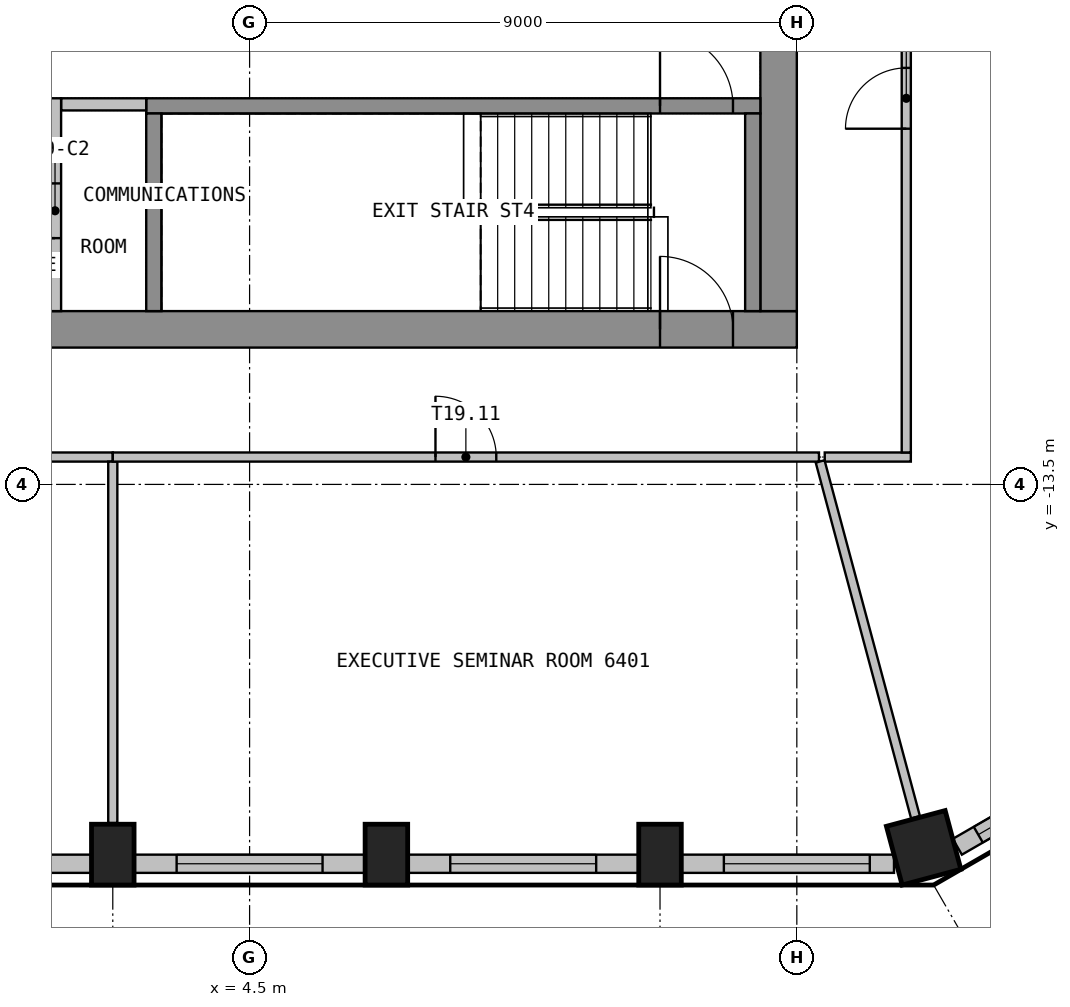
"""IFC4 building model, lengths in metres.
Left out: names, types, materials, properties, quantities, classifications, styles, units other than length and angle.
Written with IfcOpenShell. Run it as: python <this file> out.ifc"""

import sys

from ifc_helpers import new_model, si_unit, direction, frame, frame_2d, origin, origin_2d, place, context, subcontext, project, spatial, rectangle, extrude, element, fill, save


model = new_model("IFC4")
c1 = context("Model", 3, precision=1e-05, world=origin(), true_north=direction((0.0, 1.0)))
c2 = subcontext(c1, "Body", "Model", "MODEL_VIEW")
j1 = project(units=[si_unit("LENGTHUNIT", "METRE"), si_unit("PLANEANGLEUNIT", "RADIAN")], contexts=[c1])
p1 = place(None, origin())
s1 = spatial("IfcSite", under=j1, at=p1, CompositionType="ELEMENT")
p2 = place(p1, origin())
s2 = spatial("IfcBuilding", under=s1, at=p2, CompositionType="ELEMENT")
p3 = place(p2, frame((0.0, 0.0, 258.6)))
s3 = spatial("IfcBuildingStorey", under=s2, at=p3, CompositionType="ELEMENT", Elevation=258.6)
for number, where, z_axis, x_axis in (
    (1, (2.25, -19.588, 0.0), (0.0, 0.0, 1.0), (1.0, 0.0, 0.0)),
    (2, (6.75, -19.588, 0.0), (0.0, 0.0, 1.0), (1.0, 0.0, 0.0)),
    (3, (11.25, -19.588, 0.0), (0.0, 0.0, 1.0), (1.0, 0.0, 0.0)),
):
    element("IfcColumn", number, at=place(p3, frame(where, z_axis=z_axis, x_axis=x_axis)), inside=s3, PredefinedType="COLUMN", context=c2, shape_type="SweptSolid", body=[
        extrude(rectangle(XDim=0.7, YDim=1.0, at=origin_2d()), origin(), (0.0, 0.0, 1.0), 3.575),
    ])
p4 = place(p3, frame((15.586, -19.476, 0.0), z_axis=(0.0, 0.0, 1.0), x_axis=(0.965925826289, 0.258819045103, 0.0)))
e4 = element("IfcColumn", 4, at=p4, inside=s3, PredefinedType="COLUMN", context=c2, shape_type="SweptSolid", body=[
    extrude(rectangle(XDim=1.0, YDim=1.0, at=origin_2d()), origin(), (0.0, 0.0, 1.0), 3.575),
])
p5 = place(p3, frame((-1.899, -19.739, 0.0), z_axis=(0.0, 0.0, 1.0), x_axis=(1.0, 0.0, 0.0)))
e5 = element("IfcWall", 5, at=p5, inside=s3, PredefinedType="SOLIDWALL", context=c2, shape_type="SweptSolid", body=[
    extrude(rectangle(XDim=3.799, YDim=0.3, at=frame_2d((1.899, 0.0))), origin(), (0.0, 0.0, 1.0), 3.575),
])
p6 = place(p5, frame((0.699, 0.0, 0.9)))
e6 = element("IfcOpeningElement", 6, at=p6, cuts=e5, PredefinedType="OPENING", context=c2, shape_type="SweptSolid", body=[
    extrude(rectangle(XDim=2.4, YDim=2.1, at=frame_2d((1.2, 1.05))), frame((0.0, 0.16, 0.0), z_axis=(0.0, -1.0, 0.0), x_axis=(1.0, 0.0, 0.0)), (0.0, 0.0, 1.0), 0.32),
])
p7 = place(p3, frame((2.601, -19.739, 0.0), z_axis=(0.0, 0.0, 1.0), x_axis=(1.0, 0.0, 0.0)))
e7 = element("IfcWall", 7, at=p7, inside=s3, PredefinedType="SOLIDWALL", context=c2, shape_type="SweptSolid", body=[
    extrude(rectangle(XDim=3.799, YDim=0.3, at=frame_2d((1.899, 0.0))), origin(), (0.0, 0.0, 1.0), 3.575),
])
p8 = place(p7, frame((0.699, 0.0, 0.9)))
e8 = element("IfcOpeningElement", 8, at=p8, cuts=e7, PredefinedType="OPENING", context=c2, shape_type="SweptSolid", body=[
    extrude(rectangle(XDim=2.4, YDim=2.1, at=frame_2d((1.2, 1.05))), frame((0.0, 0.16, 0.0), z_axis=(0.0, -1.0, 0.0), x_axis=(1.0, 0.0, 0.0)), (0.0, 0.0, 1.0), 0.32),
])
p9 = place(p3, frame((7.101, -19.739, 0.0), z_axis=(0.0, 0.0, 1.0), x_axis=(1.0, 0.0, 0.0)))
e9 = element("IfcWall", 9, at=p9, inside=s3, PredefinedType="SOLIDWALL", context=c2, shape_type="SweptSolid", body=[
    extrude(rectangle(XDim=3.799, YDim=0.3, at=frame_2d((1.899, 0.0))), origin(), (0.0, 0.0, 1.0), 3.575),
])
p10 = place(p9, frame((0.699, 0.0, 0.9)))
e10 = element("IfcOpeningElement", 10, at=p10, cuts=e9, PredefinedType="OPENING", context=c2, shape_type="SweptSolid", body=[
    extrude(rectangle(XDim=2.4, YDim=2.1, at=frame_2d((1.2, 1.05))), frame((0.0, 0.16, 0.0), z_axis=(0.0, -1.0, 0.0), x_axis=(1.0, 0.0, 0.0)), (0.0, 0.0, 1.0), 0.32),
])
p11 = place(p3, frame((11.601, -19.739, 0.0), z_axis=(0.0, 0.0, 1.0), x_axis=(1.0, 0.0, 0.0)))
e11 = element("IfcWall", 11, at=p11, inside=s3, PredefinedType="SOLIDWALL", context=c2, shape_type="SweptSolid", body=[
    extrude(rectangle(XDim=3.498, YDim=0.3, at=frame_2d((1.749, 0.0))), origin(), (0.0, 0.0, 1.0), 3.575),
])
p12 = place(p11, frame((0.699, 0.0, 0.9)))
e12 = element("IfcOpeningElement", 12, at=p12, cuts=e11, PredefinedType="OPENING", context=c2, shape_type="SweptSolid", body=[
    extrude(rectangle(XDim=2.4, YDim=2.1, at=frame_2d((1.2, 1.05))), frame((0.0, 0.16, 0.0), z_axis=(0.0, -1.0, 0.0), x_axis=(1.0, 0.0, 0.0)), (0.0, 0.0, 1.0), 0.32),
])
p13 = place(p3, frame((16.14, -19.459, 0.0), z_axis=(0.0, 0.0, 1.0), x_axis=(0.866025316205, 0.500000151692, 0.0)))
e13 = element("IfcWall", 13, at=p13, inside=s3, PredefinedType="SOLIDWALL", context=c2, shape_type="SweptSolid", body=[
    extrude(rectangle(XDim=3.196, YDim=0.3, at=frame_2d((1.598, 0.0))), origin(), (0.0, 0.0, 1.0), 3.575),
])
p14 = place(p13, frame((0.398, 0.0, 0.9)))
e14 = element("IfcOpeningElement", 14, at=p14, cuts=e13, PredefinedType="OPENING", context=c2, shape_type="SweptSolid", body=[
    extrude(rectangle(XDim=2.4, YDim=2.1, at=frame_2d((1.2, 1.05))), frame((0.0, 0.16, 0.0), z_axis=(0.0, -1.0, 0.0), x_axis=(1.0, 0.0, 0.0)), (0.0, 0.0, 1.0), 0.32),
])
p15 = place(p3, frame((-13.5, -10.95, 0.0), z_axis=(0.0, 0.0, 1.0), x_axis=(1.0, 0.0, 0.0)))
e15 = element("IfcWall", 15, at=p15, inside=s3, PredefinedType="SHEAR", context=c2, shape_type="SweptSolid", body=[
    extrude(rectangle(XDim=27.0, YDim=0.6, at=frame_2d((13.5, 0.0))), origin(), (0.0, 0.0, 1.0), 3.575),
])
p16 = place(p15, frame((12.3, 0.0, 0.0)))
e16 = element("IfcOpeningElement", 16, at=p16, cuts=e15, PredefinedType="OPENING", context=c2, shape_type="SweptSolid", body=[
    extrude(rectangle(XDim=2.4, YDim=2.1, at=frame_2d((1.2, 1.05))), frame((0.0, 0.31, 0.0), z_axis=(0.0, -1.0, 0.0), x_axis=(1.0, 0.0, 0.0)), (0.0, 0.0, 1.0), 0.62),
])
p17 = place(p15, frame((1.05, 0.0, 0.0)))
e17 = element("IfcOpeningElement", 17, at=p17, cuts=e15, PredefinedType="OPENING", context=c2, shape_type="SweptSolid", body=[
    extrude(rectangle(XDim=1.2, YDim=2.1, at=frame_2d((0.6, 1.05))), frame((0.0, 0.31, 0.0), z_axis=(0.0, -1.0, 0.0), x_axis=(1.0, 0.0, 0.0)), (0.0, 0.0, 1.0), 0.62),
])
p18 = place(p15, frame((24.75, 0.0, 0.0)))
e18 = element("IfcOpeningElement", 18, at=p18, cuts=e15, PredefinedType="OPENING", context=c2, shape_type="SweptSolid", body=[
    extrude(rectangle(XDim=1.2, YDim=2.1, at=frame_2d((0.6, 1.05))), frame((0.0, 0.31, 0.0), z_axis=(0.0, -1.0, 0.0), x_axis=(1.0, 0.0, 0.0)), (0.0, 0.0, 1.0), 0.62),
])
p19 = place(p3, frame((13.2, -10.65, 0.0), z_axis=(0.0, 0.0, 1.0), x_axis=(0.0, 1.0, 0.0)))
e19 = element("IfcWall", 19, at=p19, inside=s3, PredefinedType="SHEAR", context=c2, shape_type="SweptSolid", body=[
    extrude(rectangle(XDim=21.3, YDim=0.6, at=frame_2d((10.65, 0.0))), origin(), (0.0, 0.0, 1.0), 3.575),
])
p20 = place(p19, frame((9.45, 0.0, 0.0)))
e20 = element("IfcOpeningElement", 20, at=p20, cuts=e19, PredefinedType="OPENING", context=c2, shape_type="SweptSolid", body=[
    extrude(rectangle(XDim=2.4, YDim=2.1, at=frame_2d((1.2, 1.05))), frame((0.0, 0.31, 0.0), z_axis=(0.0, -1.0, 0.0), x_axis=(1.0, 0.0, 0.0)), (0.0, 0.0, 1.0), 0.62),
])
p21 = place(p3, frame((2.8, -7.275, 0.0), z_axis=(0.0, 0.0, 1.0), x_axis=(1.0, 0.0, 0.0)))
e21 = element("IfcWall", 21, at=p21, inside=s3, PredefinedType="SHEAR", context=c2, shape_type="SweptSolid", body=[
    extrude(rectangle(XDim=10.1, YDim=0.25, at=frame_2d((5.05, 0.0))), origin(), (0.0, 0.0, 1.0), 3.575),
])
p22 = place(p21, frame((8.45, 0.0, 0.0)))
e22 = element("IfcOpeningElement", 22, at=p22, cuts=e21, PredefinedType="OPENING", context=c2, shape_type="SweptSolid", body=[
    extrude(rectangle(XDim=1.2, YDim=2.1, at=frame_2d((0.6, 1.05))), frame((0.0, 0.135, 0.0), z_axis=(0.0, -1.0, 0.0), x_axis=(1.0, 0.0, 0.0)), (0.0, 0.0, 1.0), 0.27),
])
for number, where, z_axis, x_axis in (
    (23, (2.925, -10.65, 0.0), (0.0, 0.0, 1.0), (0.0, 1.0, 0.0)),
    (24, (12.775, -10.65, 0.0), (0.0, 0.0, 1.0), (0.0, 1.0, 0.0)),
):
    element("IfcWall", number, at=place(p3, frame(where, z_axis=z_axis, x_axis=x_axis)), inside=s3, PredefinedType="SHEAR", context=c2, shape_type="SweptSolid", body=[
        extrude(rectangle(XDim=3.25, YDim=0.25, at=frame_2d((1.625, 0.0))), origin(), (0.0, 0.0, 1.0), 3.575),
    ])
p23 = place(p3, frame((1.4, -7.25, 0.0), z_axis=(0.0, 0.0, 1.0), x_axis=(1.0, 0.0, 0.0)))
e25 = element("IfcWall", 25, at=p23, inside=s3, PredefinedType="PARTITIONING", context=c2, shape_type="SweptSolid", body=[
    extrude(rectangle(XDim=1.4, YDim=0.2, at=frame_2d((0.7, 0.0))), origin(), (0.0, 0.0, 1.0), 3.575),
])
p24 = place(p3, frame((1.3, -10.65, 0.0), z_axis=(0.0, 0.0, 1.0), x_axis=(0.0, 1.0, 0.0)))
e26 = element("IfcWall", 26, at=p24, inside=s3, PredefinedType="PARTITIONING", context=c2, shape_type="SweptSolid", body=[
    extrude(rectangle(XDim=3.5, YDim=0.2, at=frame_2d((1.75, 0.0))), origin(), (0.0, 0.0, 1.0), 3.575),
])
p25 = place(p24, frame((1.2, 0.0, 0.0)))
e27 = element("IfcOpeningElement", 27, at=p25, cuts=e26, PredefinedType="OPENING", context=c2, shape_type="SweptSolid", body=[
    extrude(rectangle(XDim=0.9, YDim=2.1, at=frame_2d((0.45, 1.05))), frame((0.0, 0.11, 0.0), z_axis=(0.0, -1.0, 0.0), x_axis=(1.0, 0.0, 0.0)), (0.0, 0.0, 1.0), 0.22),
])
p26 = place(p3, frame((-11.25, -13.05, 0.0), z_axis=(0.0, 0.0, 1.0), x_axis=(1.0, 0.0, 0.0)))
e28 = element("IfcWall", 28, at=p26, inside=s3, PredefinedType="PARTITIONING", context=c2, shape_type="SweptSolid", body=[
    extrude(rectangle(XDim=13.5, YDim=0.15, at=frame_2d((6.75, 0.0))), origin(), (0.0, 0.0, 1.0), 3.575),
])
p27 = place(p26, frame((6.25, 0.0, 0.0)))
e29 = element("IfcOpeningElement", 29, at=p27, cuts=e28, PredefinedType="OPENING", context=c2, shape_type="SweptSolid", body=[
    extrude(rectangle(XDim=1.0, YDim=2.1, at=frame_2d((0.5, 1.05))), frame((0.0, 0.085, 0.0), z_axis=(0.0, -1.0, 0.0), x_axis=(1.0, 0.0, 0.0)), (0.0, 0.0, 1.0), 0.17),
])
p28 = place(p3, frame((2.25, -13.125, 0.0), z_axis=(0.0, 0.0, 1.0), x_axis=(0.0, -1.0, 0.0)))
e30 = element("IfcWall", 30, at=p28, inside=s3, PredefinedType="PARTITIONING", context=c2, shape_type="SweptSolid", body=[
    extrude(rectangle(XDim=5.944, YDim=0.15, at=frame_2d((2.972, 0.0))), origin(), (0.0, 0.0, 1.0), 3.575),
])
p29 = place(p3, frame((2.25, -13.05, 0.0), z_axis=(0.0, 0.0, 1.0), x_axis=(1.0, 0.0, 0.0)))
e31 = element("IfcWall", 31, at=p29, inside=s3, PredefinedType="PARTITIONING", context=c2, shape_type="SweptSolid", body=[
    extrude(rectangle(XDim=11.614, YDim=0.15, at=frame_2d((5.807, 0.0))), origin(), (0.0, 0.0, 1.0), 3.575),
])
p30 = place(p29, frame((5.307, 0.0, 0.0)))
e32 = element("IfcOpeningElement", 32, at=p30, cuts=e31, PredefinedType="OPENING", context=c2, shape_type="SweptSolid", body=[
    extrude(rectangle(XDim=1.0, YDim=2.1, at=frame_2d((0.5, 1.05))), frame((0.0, 0.085, 0.0), z_axis=(0.0, -1.0, 0.0), x_axis=(1.0, 0.0, 0.0)), (0.0, 0.0, 1.0), 0.17),
])
p31 = place(p3, frame((13.959, -13.05, 0.0), z_axis=(0.0, 0.0, 1.0), x_axis=(1.0, 0.0, 0.0)))
e33 = element("IfcWall", 33, at=p31, inside=s3, PredefinedType="PARTITIONING", context=c2, shape_type="SweptSolid", body=[
    extrude(rectangle(XDim=1.416, YDim=0.15, at=frame_2d((0.708, 0.0))), origin(), (0.0, 0.0, 1.0), 3.575),
])
p32 = place(p3, frame((13.883, -13.122, 0.0), z_axis=(0.0, 0.0, 1.0), x_axis=(0.258896568031, -0.965905050749, 0.0)))
e34 = element("IfcWall", 34, at=p32, inside=s3, PredefinedType="PARTITIONING", context=c2, shape_type="SweptSolid", body=[
    extrude(rectangle(XDim=6.058, YDim=0.15, at=frame_2d((3.029, 0.0))), origin(), (0.0, 0.0, 1.0), 3.575),
])
p33 = place(p3, frame((15.3, -12.975, 0.0), z_axis=(0.0, 0.0, 1.0), x_axis=(0.0, 1.0, 0.0)))
e35 = element("IfcWall", 35, at=p33, inside=s3, PredefinedType="PARTITIONING", context=c2, shape_type="SweptSolid", body=[
    extrude(rectangle(XDim=11.649, YDim=0.15, at=frame_2d((5.825, 0.0))), origin(), (0.0, 0.0, 1.0), 3.575),
])
p34 = place(p33, frame((5.324, 0.0, 0.0)))
e36 = element("IfcOpeningElement", 36, at=p34, cuts=e35, PredefinedType="OPENING", context=c2, shape_type="SweptSolid", body=[
    extrude(rectangle(XDim=1.0, YDim=2.1, at=frame_2d((0.5, 1.05))), frame((0.0, 0.085, 0.0), z_axis=(0.0, -1.0, 0.0), x_axis=(1.0, 0.0, 0.0)), (0.0, 0.0, 1.0), 0.17),
])
p35 = place(p8, origin())
e37 = element("IfcWindow", 37, at=p35, inside=s3, PartitioningType="SINGLE_PANEL", PredefinedType="WINDOW", context=c2, shape_type="SweptSolid", body=[
    extrude(rectangle(XDim=2.4, YDim=2.1, at=frame_2d((1.2, 1.05))), frame((0.0, 0.03, 0.0), z_axis=(0.0, -1.0, 0.0), x_axis=(1.0, 0.0, 0.0)), (0.0, 0.0, 1.0), 0.06),
])
fill(e8, e37)
p36 = place(p10, origin())
e38 = element("IfcWindow", 38, at=p36, inside=s3, PartitioningType="SINGLE_PANEL", PredefinedType="WINDOW", context=c2, shape_type="SweptSolid", body=[
    extrude(rectangle(XDim=2.4, YDim=2.1, at=frame_2d((1.2, 1.05))), frame((0.0, 0.03, 0.0), z_axis=(0.0, -1.0, 0.0), x_axis=(1.0, 0.0, 0.0)), (0.0, 0.0, 1.0), 0.06),
])
fill(e10, e38)
p37 = place(p12, origin())
e39 = element("IfcWindow", 39, at=p37, inside=s3, PartitioningType="SINGLE_PANEL", PredefinedType="WINDOW", context=c2, shape_type="SweptSolid", body=[
    extrude(rectangle(XDim=2.4, YDim=2.1, at=frame_2d((1.2, 1.05))), frame((0.0, 0.03, 0.0), z_axis=(0.0, -1.0, 0.0), x_axis=(1.0, 0.0, 0.0)), (0.0, 0.0, 1.0), 0.06),
])
fill(e12, e39)
p38 = place(p14, origin())
e40 = element("IfcWindow", 40, at=p38, inside=s3, PartitioningType="SINGLE_PANEL", PredefinedType="WINDOW", context=c2, shape_type="SweptSolid", body=[
    extrude(rectangle(XDim=2.4, YDim=2.1, at=frame_2d((1.2, 1.05))), frame((0.0, 0.03, 0.0), z_axis=(0.0, -1.0, 0.0), x_axis=(1.0, 0.0, 0.0)), (0.0, 0.0, 1.0), 0.06),
])
fill(e14, e40)
p39 = place(p18, origin())
e41 = element("IfcDoor", 41, at=p39, inside=s3, OperationType="SINGLE_SWING_RIGHT", PredefinedType="DOOR", context=c2, shape_type="SweptSolid", body=[
    extrude(rectangle(XDim=1.2, YDim=2.1, at=frame_2d((0.6, 1.05))), frame((0.0, 0.025, 0.0), z_axis=(0.0, -1.0, 0.0), x_axis=(1.0, 0.0, 0.0)), (0.0, 0.0, 1.0), 0.05),
])
fill(e18, e41)
p40 = place(p22, origin())
e42 = element("IfcDoor", 42, at=p40, inside=s3, OperationType="SINGLE_SWING_LEFT", PredefinedType="DOOR", context=c2, shape_type="SweptSolid", body=[
    extrude(rectangle(XDim=1.2, YDim=2.1, at=frame_2d((0.6, 1.05))), frame((0.0, 0.025, 0.0), z_axis=(0.0, -1.0, 0.0), x_axis=(1.0, 0.0, 0.0)), (0.0, 0.0, 1.0), 0.05),
])
fill(e22, e42)
p41 = place(p25, origin())
e43 = element("IfcDoor", 43, at=p41, inside=s3, OperationType="SINGLE_SWING_LEFT", PredefinedType="DOOR", context=c2, shape_type="SweptSolid", body=[
    extrude(rectangle(XDim=0.9, YDim=2.1, at=frame_2d((0.45, 1.05))), frame((0.0, 0.025, 0.0), z_axis=(0.0, -1.0, 0.0), x_axis=(1.0, 0.0, 0.0)), (0.0, 0.0, 1.0), 0.05),
])
fill(e27, e43)
p42 = place(p30, origin())
e44 = element("IfcDoor", 44, at=p42, inside=s3, OperationType="SINGLE_SWING_RIGHT", PredefinedType="DOOR", context=c2, shape_type="SweptSolid", body=[
    extrude(rectangle(XDim=1.0, YDim=2.1, at=frame_2d((0.5, 1.05))), frame((0.0, 0.025, 0.0), z_axis=(0.0, -1.0, 0.0), x_axis=(1.0, 0.0, 0.0)), (0.0, 0.0, 1.0), 0.05),
])
fill(e32, e44)
p43 = place(p34, origin())
e45 = element("IfcDoor", 45, at=p43, inside=s3, OperationType="SINGLE_SWING_LEFT", PredefinedType="DOOR", context=c2, shape_type="SweptSolid", body=[
    extrude(rectangle(XDim=1.0, YDim=2.1, at=frame_2d((0.5, 1.05))), frame((0.0, 0.025, 0.0), z_axis=(0.0, -1.0, 0.0), x_axis=(1.0, 0.0, 0.0)), (0.0, 0.0, 1.0), 0.05),
])
fill(e36, e45)
save(model, sys.argv[1])
